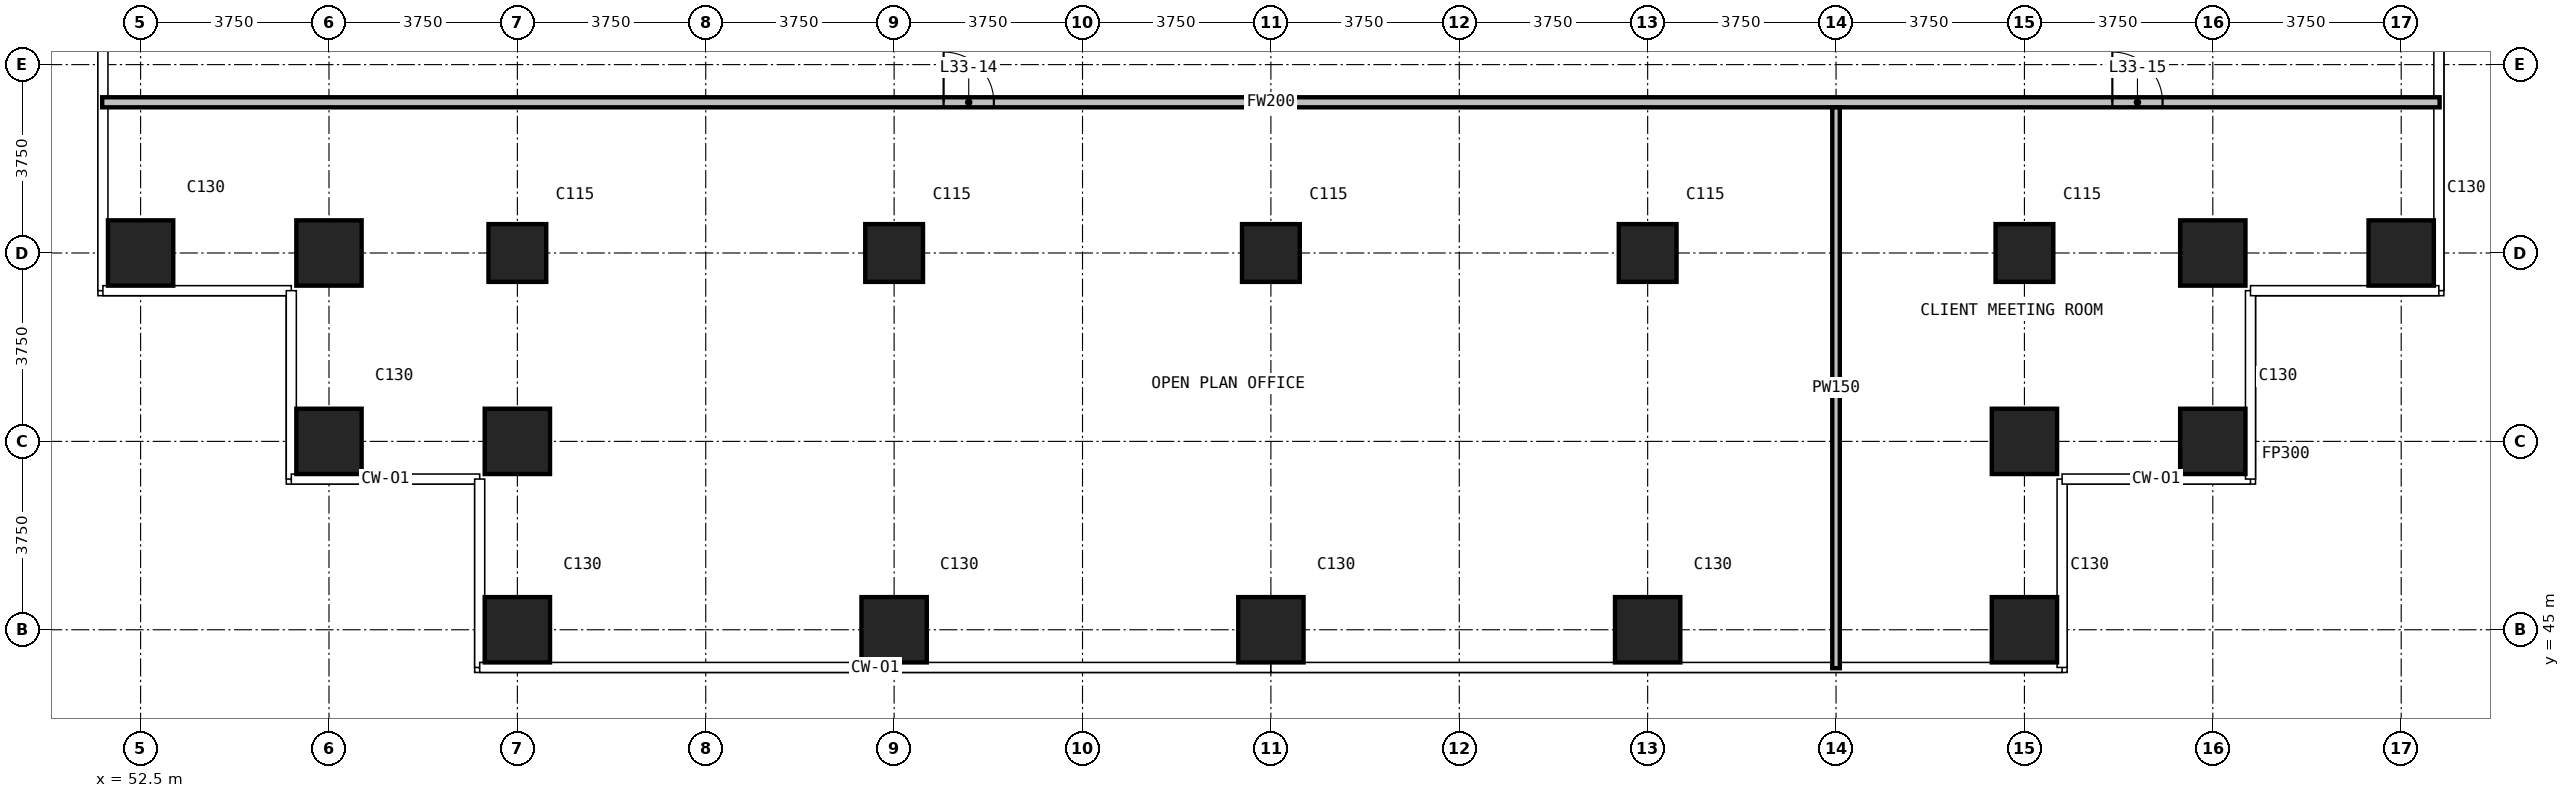
"""IFC4 building model, lengths in metres.
Left out: names, types, materials, properties, quantities, classifications, styles, units other than length and angle.
Written with IfcOpenShell. Run it as: python <this file> out.ifc"""

import sys

from ifc_helpers import new_model, si_unit, direction, frame, frame_2d, origin, origin_2d, place, context, subcontext, project, spatial, rectangle, extrude, element, fill, save


model = new_model("IFC4")
c1 = context("Model", 3, precision=1e-05, world=origin(), true_north=direction((0.0, 1.0)))
c2 = subcontext(c1, "Body", "Model", "MODEL_VIEW")
j1 = project(units=[si_unit("LENGTHUNIT", "METRE"), si_unit("PLANEANGLEUNIT", "RADIAN")], contexts=[c1])
p1 = place(None, origin())
s1 = spatial("IfcSite", under=j1, at=p1, CompositionType="ELEMENT")
p2 = place(p1, origin())
s2 = spatial("IfcBuilding", under=s1, at=p2, CompositionType="ELEMENT")
p3 = place(p2, frame((0.0, 0.0, 132.4)))
s3 = spatial("IfcBuildingStorey", under=s2, at=p3, CompositionType="ELEMENT", Elevation=132.4)
for number, where, z_axis, x_axis in (
    (1, (52.5, 52.5, 0.0), (0.0, 0.0, 1.0), (1.0, 0.0, 0.0)),
    (2, (56.25, 48.75, 0.0), (0.0, 0.0, 1.0), (1.0, 0.0, 0.0)),
    (3, (56.25, 52.5, 0.0), (0.0, 0.0, 1.0), (1.0, 0.0, 0.0)),
    (4, (60.0, 45.0, 0.0), (0.0, 0.0, 1.0), (1.0, 0.0, 0.0)),
    (5, (60.0, 48.75, 0.0), (0.0, 0.0, 1.0), (1.0, 0.0, 0.0)),
):
    element("IfcColumn", number, at=place(p3, frame(where, z_axis=z_axis, x_axis=x_axis)), inside=s3, PredefinedType="COLUMN", context=c2, shape_type="SweptSolid", body=[
        extrude(rectangle(XDim=1.3, YDim=1.3, at=origin_2d()), origin(), (0.0, 0.0, 1.0), 3.6),
    ])
p4 = place(p3, frame((60.0, 52.5, 0.0), z_axis=(0.0, 0.0, 1.0), x_axis=(1.0, 0.0, 0.0)))
e6 = element("IfcColumn", 6, at=p4, inside=s3, PredefinedType="COLUMN", context=c2, shape_type="SweptSolid", body=[
    extrude(rectangle(XDim=1.15, YDim=1.15, at=origin_2d()), origin(), (0.0, 0.0, 1.0), 3.6),
])
p5 = place(p3, frame((67.5, 45.0, 0.0), z_axis=(0.0, 0.0, 1.0), x_axis=(1.0, 0.0, 0.0)))
e7 = element("IfcColumn", 7, at=p5, inside=s3, PredefinedType="COLUMN", context=c2, shape_type="SweptSolid", body=[
    extrude(rectangle(XDim=1.3, YDim=1.3, at=origin_2d()), origin(), (0.0, 0.0, 1.0), 3.6),
])
p6 = place(p3, frame((67.5, 52.5, 0.0), z_axis=(0.0, 0.0, 1.0), x_axis=(1.0, 0.0, 0.0)))
e8 = element("IfcColumn", 8, at=p6, inside=s3, PredefinedType="COLUMN", context=c2, shape_type="SweptSolid", body=[
    extrude(rectangle(XDim=1.15, YDim=1.15, at=origin_2d()), origin(), (0.0, 0.0, 1.0), 3.6),
])
p7 = place(p3, frame((75.0, 45.0, 0.0), z_axis=(0.0, 0.0, 1.0), x_axis=(1.0, 0.0, 0.0)))
e9 = element("IfcColumn", 9, at=p7, inside=s3, PredefinedType="COLUMN", context=c2, shape_type="SweptSolid", body=[
    extrude(rectangle(XDim=1.3, YDim=1.3, at=origin_2d()), origin(), (0.0, 0.0, 1.0), 3.6),
])
p8 = place(p3, frame((75.0, 52.5, 0.0), z_axis=(0.0, 0.0, 1.0), x_axis=(1.0, 0.0, 0.0)))
e10 = element("IfcColumn", 10, at=p8, inside=s3, PredefinedType="COLUMN", context=c2, shape_type="SweptSolid", body=[
    extrude(rectangle(XDim=1.15, YDim=1.15, at=origin_2d()), origin(), (0.0, 0.0, 1.0), 3.6),
])
p9 = place(p3, frame((82.5, 45.0, 0.0), z_axis=(0.0, 0.0, 1.0), x_axis=(1.0, 0.0, 0.0)))
e11 = element("IfcColumn", 11, at=p9, inside=s3, PredefinedType="COLUMN", context=c2, shape_type="SweptSolid", body=[
    extrude(rectangle(XDim=1.3, YDim=1.3, at=origin_2d()), origin(), (0.0, 0.0, 1.0), 3.6),
])
p10 = place(p3, frame((82.5, 52.5, 0.0), z_axis=(0.0, 0.0, 1.0), x_axis=(1.0, 0.0, 0.0)))
e12 = element("IfcColumn", 12, at=p10, inside=s3, PredefinedType="COLUMN", context=c2, shape_type="SweptSolid", body=[
    extrude(rectangle(XDim=1.15, YDim=1.15, at=origin_2d()), origin(), (0.0, 0.0, 1.0), 3.6),
])
for number, where, z_axis, x_axis in (
    (13, (90.0, 45.0, 0.0), (0.0, 0.0, 1.0), (1.0, 0.0, 0.0)),
    (14, (90.0, 48.75, 0.0), (0.0, 0.0, 1.0), (1.0, 0.0, 0.0)),
):
    element("IfcColumn", number, at=place(p3, frame(where, z_axis=z_axis, x_axis=x_axis)), inside=s3, PredefinedType="COLUMN", context=c2, shape_type="SweptSolid", body=[
        extrude(rectangle(XDim=1.3, YDim=1.3, at=origin_2d()), origin(), (0.0, 0.0, 1.0), 3.6),
    ])
p11 = place(p3, frame((90.0, 52.5, 0.0), z_axis=(0.0, 0.0, 1.0), x_axis=(1.0, 0.0, 0.0)))
e15 = element("IfcColumn", 15, at=p11, inside=s3, PredefinedType="COLUMN", context=c2, shape_type="SweptSolid", body=[
    extrude(rectangle(XDim=1.15, YDim=1.15, at=origin_2d()), origin(), (0.0, 0.0, 1.0), 3.6),
])
for number, where, z_axis, x_axis in (
    (16, (93.75, 48.75, 0.0), (0.0, 0.0, 1.0), (1.0, 0.0, 0.0)),
    (17, (93.75, 52.5, 0.0), (0.0, 0.0, 1.0), (1.0, 0.0, 0.0)),
    (18, (97.5, 52.5, 0.0), (0.0, 0.0, 1.0), (1.0, 0.0, 0.0)),
):
    element("IfcColumn", number, at=place(p3, frame(where, z_axis=z_axis, x_axis=x_axis)), inside=s3, PredefinedType="COLUMN", context=c2, shape_type="SweptSolid", body=[
        extrude(rectangle(XDim=1.3, YDim=1.3, at=origin_2d()), origin(), (0.0, 0.0, 1.0), 3.6),
    ])
p12 = place(p3, frame((51.735, 55.5, 0.0), z_axis=(0.0, 0.0, 1.0), x_axis=(1.0, 0.0, 0.0)))
e19 = element("IfcWall", 19, at=p12, inside=s3, PredefinedType="PARTITIONING", context=c2, shape_type="SweptSolid", body=[
    extrude(rectangle(XDim=46.53, YDim=0.2, at=frame_2d((23.265, 0.0))), origin(), (0.0, 0.0, 1.0), 3.3),
])
p13 = place(p12, frame((16.75, 0.0, 0.0)))
e20 = element("IfcOpeningElement", 20, at=p13, cuts=e19, PredefinedType="OPENING", context=c2, shape_type="SweptSolid", body=[
    extrude(rectangle(XDim=1.0, YDim=2.2, at=frame_2d((0.5, 1.1))), frame((0.0, 0.11, 0.0), z_axis=(0.0, -1.0, 0.0), x_axis=(1.0, 0.0, 0.0)), (0.0, 0.0, 1.0), 0.22),
])
p14 = place(p12, frame((40.015, 0.0, 0.0)))
e21 = element("IfcOpeningElement", 21, at=p14, cuts=e19, PredefinedType="OPENING", context=c2, shape_type="SweptSolid", body=[
    extrude(rectangle(XDim=1.0, YDim=2.2, at=frame_2d((0.5, 1.1))), frame((0.0, 0.11, 0.0), z_axis=(0.0, -1.0, 0.0), x_axis=(1.0, 0.0, 0.0)), (0.0, 0.0, 1.0), 0.22),
])
p15 = place(p3, frame((86.25, 44.235, 0.0), z_axis=(0.0, 0.0, 1.0), x_axis=(0.0, 1.0, 0.0)))
e22 = element("IfcWall", 22, at=p15, inside=s3, PredefinedType="PARTITIONING", context=c2, shape_type="SweptSolid", body=[
    extrude(rectangle(XDim=11.165, YDim=0.15, at=frame_2d((5.583, 0.0))), origin(), (0.0, 0.0, 1.0), 3.3),
])
p16 = place(p13, origin())
e23 = element("IfcDoor", 23, at=p16, inside=s3, OperationType="SINGLE_SWING_RIGHT", PredefinedType="DOOR", context=c2, shape_type="SweptSolid", body=[
    extrude(rectangle(XDim=1.0, YDim=2.2, at=frame_2d((0.5, 1.1))), frame((0.0, 0.025, 0.0), z_axis=(0.0, -1.0, 0.0), x_axis=(1.0, 0.0, 0.0)), (0.0, 0.0, 1.0), 0.05),
])
fill(e20, e23)
p17 = place(p14, origin())
e24 = element("IfcDoor", 24, at=p17, inside=s3, OperationType="SINGLE_SWING_LEFT", PredefinedType="DOOR", context=c2, shape_type="SweptSolid", body=[
    extrude(rectangle(XDim=1.0, YDim=2.2, at=frame_2d((0.5, 1.1))), frame((0.0, 0.025, 0.0), z_axis=(0.0, -1.0, 0.0), x_axis=(1.0, 0.0, 0.0)), (0.0, 0.0, 1.0), 0.05),
])
fill(e21, e24)
save(model, sys.argv[1])
